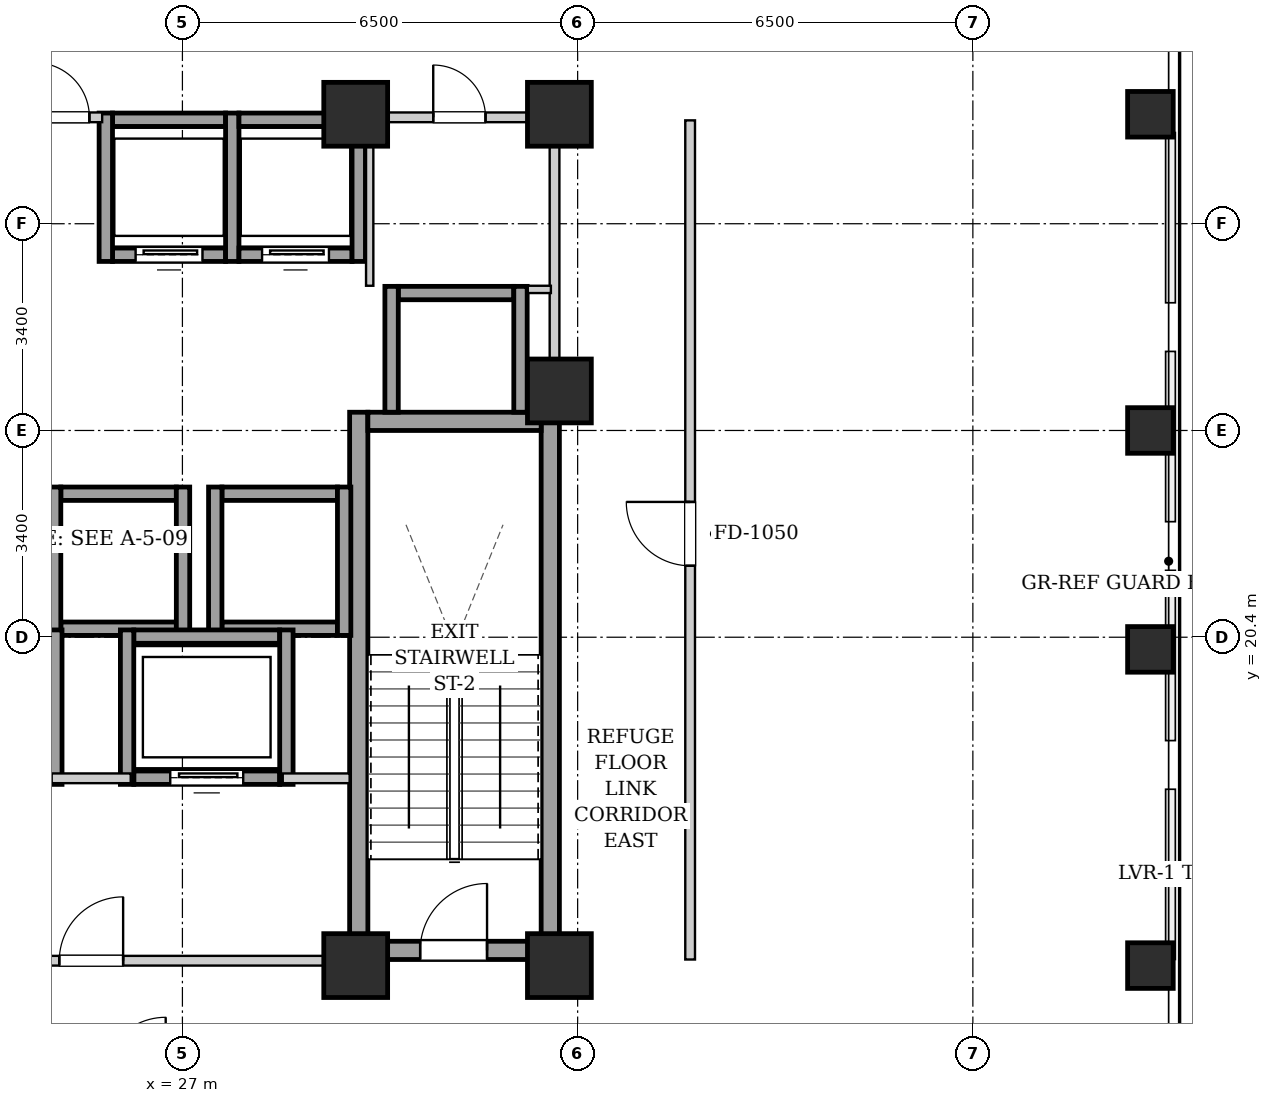
"""IFC4 building model, lengths in metres.
Left out: names, types, materials, properties, quantities, classifications, styles, units other than length and angle.
Written with IfcOpenShell. Run it as: python <this file> out.ifc"""

import sys

from ifc_helpers import new_model, si_unit, direction, frame, frame_2d, origin, origin_2d, place, context, subcontext, project, spatial, rectangle, extrude, element, fill, save


model = new_model("IFC4")
c1 = context("Model", 3, precision=1e-05, world=origin(), true_north=direction((0.0, 1.0)))
c2 = subcontext(c1, "Body", "Model", "MODEL_VIEW")
j1 = project(units=[si_unit("LENGTHUNIT", "METRE"), si_unit("PLANEANGLEUNIT", "RADIAN")], contexts=[c1])
p1 = place(None, origin())
s1 = spatial("IfcSite", under=j1, at=p1, CompositionType="ELEMENT")
p2 = place(p1, origin())
s2 = spatial("IfcBuilding", under=s1, at=p2, CompositionType="ELEMENT")
p3 = place(p2, frame((0.0, 0.0, 119.9)))
s3 = spatial("IfcBuildingStorey", under=s2, at=p3, CompositionType="ELEMENT", Elevation=119.9)
for number, where, z_axis, x_axis in (
    (1, (42.92, 15.0, 0.0), (0.0, 0.0, 1.0), (1.0, 0.0, 0.0)),
    (2, (42.92, 20.2, 0.0), (0.0, 0.0, 1.0), (1.0, 0.0, 0.0)),
    (3, (42.92, 23.8, 0.0), (0.0, 0.0, 1.0), (1.0, 0.0, 0.0)),
    (4, (42.92, 29.0, 0.0), (0.0, 0.0, 1.0), (1.0, 0.0, 0.0)),
):
    element("IfcColumn", number, at=place(p3, frame(where, z_axis=z_axis, x_axis=x_axis)), inside=s3, PredefinedType="COLUMN", context=c2, shape_type="SweptSolid", body=[
        extrude(rectangle(XDim=0.75, YDim=0.75, at=origin_2d()), origin(), (0.0, 0.0, 1.0), 4.5),
    ])
for number, where, z_axis, x_axis in (
    (5, (29.85, 15.0, 0.0), (0.0, 0.0, 1.0), (1.0, 0.0, 0.0)),
    (6, (33.2, 15.0, 0.0), (0.0, 0.0, 1.0), (1.0, 0.0, 0.0)),
    (7, (29.85, 29.0, 0.0), (0.0, 0.0, 1.0), (1.0, 0.0, 0.0)),
    (8, (33.2, 29.0, 0.0), (0.0, 0.0, 1.0), (1.0, 0.0, 0.0)),
    (9, (33.2, 24.45, 0.0), (0.0, 0.0, 1.0), (1.0, 0.0, 0.0)),
):
    element("IfcColumn", number, at=place(p3, frame(where, z_axis=z_axis, x_axis=x_axis)), inside=s3, PredefinedType="COLUMN", context=c2, shape_type="SweptSolid", body=[
        extrude(rectangle(XDim=1.05, YDim=1.05, at=origin_2d()), origin(), (0.0, 0.0, 1.0), 4.5),
    ])
for number, where, z_axis, x_axis in (
    (10, (29.9, 15.1, 0.0), (0.0, 0.0, 1.0), (0.0, 1.0, 0.0)),
    (11, (33.05, 15.1, 0.0), (0.0, 0.0, 1.0), (0.0, 1.0, 0.0)),
):
    element("IfcWall", number, at=place(p3, frame(where, z_axis=z_axis, x_axis=x_axis)), inside=s3, PredefinedType="SHEAR", context=c2, shape_type="SweptSolid", body=[
        extrude(rectangle(XDim=9.0, YDim=0.3, at=frame_2d((4.5, 0.0))), origin(), (0.0, 0.0, 1.0), 4.18),
    ])
p4 = place(p3, frame((30.05, 23.95, 0.0), z_axis=(0.0, 0.0, 1.0), x_axis=(1.0, 0.0, 0.0)))
e12 = element("IfcWall", 12, at=p4, inside=s3, PredefinedType="SHEAR", context=c2, shape_type="SweptSolid", body=[
    extrude(rectangle(XDim=2.85, YDim=0.3, at=frame_2d((1.425, 0.0))), origin(), (0.0, 0.0, 1.0), 4.18),
])
p5 = place(p3, frame((30.05, 15.25, 0.0), z_axis=(0.0, 0.0, 1.0), x_axis=(1.0, 0.0, 0.0)))
e13 = element("IfcWall", 13, at=p5, inside=s3, PredefinedType="SHEAR", context=c2, shape_type="SweptSolid", body=[
    extrude(rectangle(XDim=2.85, YDim=0.3, at=frame_2d((1.425, 0.0))), origin(), (0.0, 0.0, 1.0), 4.18),
])
p6 = place(p5, frame((0.86, 0.0, 0.0)))
e14 = element("IfcOpeningElement", 14, at=p6, cuts=e13, PredefinedType="OPENING", context=c2, shape_type="SweptSolid", body=[
    extrude(rectangle(XDim=1.1, YDim=2.05, at=frame_2d((0.55, 1.025))), frame((0.0, 0.16, 0.0), z_axis=(0.0, -1.0, 0.0), x_axis=(1.0, 0.0, 0.0)), (0.0, 0.0, 1.0), 0.32),
])
p7 = place(p3, frame((25.85, 26.69, 0.0), z_axis=(0.0, 0.0, 1.0), x_axis=(1.0, 0.0, 0.0)))
e15 = element("IfcWall", 15, at=p7, inside=s3, PredefinedType="SHEAR", context=c2, shape_type="SweptSolid", body=[
    extrude(rectangle(XDim=1.86, YDim=0.22, at=frame_2d((0.93, 0.0))), origin(), (0.0, 0.0, 1.0), 4.18),
])
p8 = place(p7, frame((0.38, 0.0, 0.0)))
e16 = element("IfcOpeningElement", 16, at=p8, cuts=e15, PredefinedType="OPENING", context=c2, shape_type="SweptSolid", body=[
    extrude(rectangle(XDim=1.1, YDim=2.15, at=frame_2d((0.55, 1.075))), frame((0.0, 0.12, 0.0), z_axis=(0.0, -1.0, 0.0), x_axis=(1.0, 0.0, 0.0)), (0.0, 0.0, 1.0), 0.24),
])
p9 = place(p3, frame((25.85, 28.91, 0.0), z_axis=(0.0, 0.0, 1.0), x_axis=(1.0, 0.0, 0.0)))
e17 = element("IfcWall", 17, at=p9, inside=s3, PredefinedType="SHEAR", context=c2, shape_type="SweptSolid", body=[
    extrude(rectangle(XDim=1.86, YDim=0.22, at=frame_2d((0.93, 0.0))), origin(), (0.0, 0.0, 1.0), 4.18),
])
for number, where, z_axis, x_axis in (
    (18, (25.74, 26.58, 0.0), (0.0, 0.0, 1.0), (0.0, 1.0, 0.0)),
    (19, (27.82, 26.58, 0.0), (0.0, 0.0, 1.0), (0.0, 1.0, 0.0)),
):
    element("IfcWall", number, at=place(p3, frame(where, z_axis=z_axis, x_axis=x_axis)), inside=s3, PredefinedType="SHEAR", context=c2, shape_type="SweptSolid", body=[
        extrude(rectangle(XDim=2.44, YDim=0.22, at=frame_2d((1.22, 0.0))), origin(), (0.0, 0.0, 1.0), 4.18),
    ])
p10 = place(p3, frame((27.93, 26.69, 0.0), z_axis=(0.0, 0.0, 1.0), x_axis=(1.0, 0.0, 0.0)))
e20 = element("IfcWall", 20, at=p10, inside=s3, PredefinedType="SHEAR", context=c2, shape_type="SweptSolid", body=[
    extrude(rectangle(XDim=1.86, YDim=0.22, at=frame_2d((0.93, 0.0))), origin(), (0.0, 0.0, 1.0), 4.18),
])
p11 = place(p10, frame((0.38, 0.0, 0.0)))
e21 = element("IfcOpeningElement", 21, at=p11, cuts=e20, PredefinedType="OPENING", context=c2, shape_type="SweptSolid", body=[
    extrude(rectangle(XDim=1.1, YDim=2.15, at=frame_2d((0.55, 1.075))), frame((0.0, 0.12, 0.0), z_axis=(0.0, -1.0, 0.0), x_axis=(1.0, 0.0, 0.0)), (0.0, 0.0, 1.0), 0.24),
])
p12 = place(p3, frame((27.93, 28.91, 0.0), z_axis=(0.0, 0.0, 1.0), x_axis=(1.0, 0.0, 0.0)))
e22 = element("IfcWall", 22, at=p12, inside=s3, PredefinedType="SHEAR", context=c2, shape_type="SweptSolid", body=[
    extrude(rectangle(XDim=1.86, YDim=0.22, at=frame_2d((0.93, 0.0))), origin(), (0.0, 0.0, 1.0), 4.18),
])
p13 = place(p3, frame((29.9, 26.58, 0.0), z_axis=(0.0, 0.0, 1.0), x_axis=(0.0, 1.0, 0.0)))
e23 = element("IfcWall", 23, at=p13, inside=s3, PredefinedType="SHEAR", context=c2, shape_type="SweptSolid", body=[
    extrude(rectangle(XDim=2.44, YDim=0.22, at=frame_2d((1.22, 0.0))), origin(), (0.0, 0.0, 1.0), 4.18),
])
for number, where, z_axis, x_axis in (
    (24, (25.0, 20.54, 0.0), (0.0, 0.0, 1.0), (1.0, 0.0, 0.0)),
    (25, (25.0, 22.76, 0.0), (0.0, 0.0, 1.0), (1.0, 0.0, 0.0)),
):
    element("IfcWall", number, at=place(p3, frame(where, z_axis=z_axis, x_axis=x_axis)), inside=s3, PredefinedType="SHEAR", context=c2, shape_type="SweptSolid", body=[
        extrude(rectangle(XDim=1.9, YDim=0.22, at=frame_2d((0.95, 0.0))), origin(), (0.0, 0.0, 1.0), 4.18),
    ])
for number, where, z_axis, x_axis in (
    (26, (24.89, 20.43, 0.0), (0.0, 0.0, 1.0), (0.0, 1.0, 0.0)),
    (27, (27.01, 20.43, 0.0), (0.0, 0.0, 1.0), (0.0, 1.0, 0.0)),
):
    element("IfcWall", number, at=place(p3, frame(where, z_axis=z_axis, x_axis=x_axis)), inside=s3, PredefinedType="SHEAR", context=c2, shape_type="SweptSolid", body=[
        extrude(rectangle(XDim=2.44, YDim=0.22, at=frame_2d((1.22, 0.0))), origin(), (0.0, 0.0, 1.0), 4.18),
    ])
for number, where, z_axis, x_axis in (
    (28, (27.65, 20.54, 0.0), (0.0, 0.0, 1.0), (1.0, 0.0, 0.0)),
    (29, (27.65, 22.76, 0.0), (0.0, 0.0, 1.0), (1.0, 0.0, 0.0)),
):
    element("IfcWall", number, at=place(p3, frame(where, z_axis=z_axis, x_axis=x_axis)), inside=s3, PredefinedType="SHEAR", context=c2, shape_type="SweptSolid", body=[
        extrude(rectangle(XDim=1.9, YDim=0.22, at=frame_2d((0.95, 0.0))), origin(), (0.0, 0.0, 1.0), 4.18),
    ])
for number, where, z_axis, x_axis in (
    (30, (27.54, 20.43, 0.0), (0.0, 0.0, 1.0), (0.0, 1.0, 0.0)),
    (31, (29.66, 20.43, 0.0), (0.0, 0.0, 1.0), (0.0, 1.0, 0.0)),
):
    element("IfcWall", number, at=place(p3, frame(where, z_axis=z_axis, x_axis=x_axis)), inside=s3, PredefinedType="SHEAR", context=c2, shape_type="SweptSolid", body=[
        extrude(rectangle(XDim=2.44, YDim=0.22, at=frame_2d((1.22, 0.0))), origin(), (0.0, 0.0, 1.0), 4.18),
    ])
p14 = place(p3, frame((30.55, 26.06, 0.0), z_axis=(0.0, 0.0, 1.0), x_axis=(1.0, 0.0, 0.0)))
e32 = element("IfcWall", 32, at=p14, inside=s3, PredefinedType="SHEAR", context=c2, shape_type="SweptSolid", body=[
    extrude(rectangle(XDim=1.9, YDim=0.22, at=frame_2d((0.95, 0.0))), origin(), (0.0, 0.0, 1.0), 4.18),
])
for number, where, z_axis, x_axis in (
    (33, (30.44, 24.1, 0.0), (0.0, 0.0, 1.0), (0.0, 1.0, 0.0)),
    (34, (32.56, 24.1, 0.0), (0.0, 0.0, 1.0), (0.0, 1.0, 0.0)),
):
    element("IfcWall", number, at=place(p3, frame(where, z_axis=z_axis, x_axis=x_axis)), inside=s3, PredefinedType="SHEAR", context=c2, shape_type="SweptSolid", body=[
        extrude(rectangle(XDim=2.07, YDim=0.22, at=frame_2d((1.035, 0.0))), origin(), (0.0, 0.0, 1.0), 4.18),
    ])
p15 = place(p3, frame((24.91, 17.98, 0.0), z_axis=(0.0, 0.0, 1.0), x_axis=(0.0, 1.0, 0.0)))
e35 = element("IfcWall", 35, at=p15, inside=s3, PredefinedType="SHEAR", context=c2, shape_type="SweptSolid", body=[
    extrude(rectangle(XDim=2.54, YDim=0.22, at=frame_2d((1.27, 0.0))), origin(), (0.0, 0.0, 1.0), 4.18),
])
p16 = place(p3, frame((26.2, 18.09, 0.0), z_axis=(0.0, 0.0, 1.0), x_axis=(1.0, 0.0, 0.0)))
e36 = element("IfcWall", 36, at=p16, inside=s3, PredefinedType="SHEAR", context=c2, shape_type="SweptSolid", body=[
    extrude(rectangle(XDim=2.4, YDim=0.22, at=frame_2d((1.2, 0.0))), origin(), (0.0, 0.0, 1.0), 4.18),
])
p17 = place(p16, frame((0.6, 0.0, 0.0)))
e37 = element("IfcOpeningElement", 37, at=p17, cuts=e36, PredefinedType="OPENING", context=c2, shape_type="SweptSolid", body=[
    extrude(rectangle(XDim=1.2, YDim=2.15, at=frame_2d((0.6, 1.075))), frame((0.0, 0.12, 0.0), z_axis=(0.0, -1.0, 0.0), x_axis=(1.0, 0.0, 0.0)), (0.0, 0.0, 1.0), 0.24),
])
p18 = place(p3, frame((26.2, 20.41, 0.0), z_axis=(0.0, 0.0, 1.0), x_axis=(1.0, 0.0, 0.0)))
e38 = element("IfcWall", 38, at=p18, inside=s3, PredefinedType="SHEAR", context=c2, shape_type="SweptSolid", body=[
    extrude(rectangle(XDim=2.4, YDim=0.22, at=frame_2d((1.2, 0.0))), origin(), (0.0, 0.0, 1.0), 4.18),
])
for number, where, z_axis, x_axis in (
    (39, (26.09, 17.98, 0.0), (0.0, 0.0, 1.0), (0.0, 1.0, 0.0)),
    (40, (28.71, 17.98, 0.0), (0.0, 0.0, 1.0), (0.0, 1.0, 0.0)),
):
    element("IfcWall", number, at=place(p3, frame(where, z_axis=z_axis, x_axis=x_axis)), inside=s3, PredefinedType="SHEAR", context=c2, shape_type="SweptSolid", body=[
        extrude(rectangle(XDim=2.54, YDim=0.22, at=frame_2d((1.27, 0.0))), origin(), (0.0, 0.0, 1.0), 4.18),
    ])
p19 = place(p3, frame((21.25, 15.08, 0.0), z_axis=(0.0, 0.0, 1.0), x_axis=(1.0, 0.0, 0.0)))
e41 = element("IfcWall", 41, at=p19, inside=s3, PredefinedType="PARTITIONING", context=c2, shape_type="SweptSolid", body=[
    extrude(rectangle(XDim=8.5, YDim=0.16, at=frame_2d((4.25, 0.0))), origin(), (0.0, 0.0, 1.0), 4.18),
])
p20 = place(p19, frame((3.725, 0.0, 0.0)))
e42 = element("IfcOpeningElement", 42, at=p20, cuts=e41, PredefinedType="OPENING", context=c2, shape_type="SweptSolid", body=[
    extrude(rectangle(XDim=1.05, YDim=2.05, at=frame_2d((0.525, 1.025))), frame((0.0, 0.09, 0.0), z_axis=(0.0, -1.0, 0.0), x_axis=(1.0, 0.0, 0.0)), (0.0, 0.0, 1.0), 0.18),
])
p21 = place(p3, frame((24.85, 18.08, 0.0), z_axis=(0.0, 0.0, 1.0), x_axis=(1.0, 0.0, 0.0)))
e43 = element("IfcWall", 43, at=p21, inside=s3, PredefinedType="PARTITIONING", context=c2, shape_type="SweptSolid", body=[
    extrude(rectangle(XDim=1.3, YDim=0.16, at=frame_2d((0.65, 0.0))), origin(), (0.0, 0.0, 1.0), 4.18),
])
p22 = place(p3, frame((28.65, 18.08, 0.0), z_axis=(0.0, 0.0, 1.0), x_axis=(1.0, 0.0, 0.0)))
e44 = element("IfcWall", 44, at=p22, inside=s3, PredefinedType="PARTITIONING", context=c2, shape_type="SweptSolid", body=[
    extrude(rectangle(XDim=1.1, YDim=0.16, at=frame_2d((0.55, 0.0))), origin(), (0.0, 0.0, 1.0), 4.18),
])
p23 = place(p3, frame((33.12, 24.12, 0.0), z_axis=(0.0, 0.0, 1.0), x_axis=(0.0, 1.0, 0.0)))
e45 = element("IfcWall", 45, at=p23, inside=s3, PredefinedType="PARTITIONING", context=c2, shape_type="SweptSolid", body=[
    extrude(rectangle(XDim=4.76, YDim=0.16, at=frame_2d((2.38, 0.0))), origin(), (0.0, 0.0, 1.0), 4.18),
])
p24 = place(p3, frame((24.36, 28.95, 0.0), z_axis=(0.0, 0.0, 1.0), x_axis=(1.0, 0.0, 0.0)))
e46 = element("IfcWall", 46, at=p24, inside=s3, PredefinedType="PARTITIONING", context=c2, shape_type="SweptSolid", body=[
    extrude(rectangle(XDim=1.32, YDim=0.16, at=frame_2d((0.66, 0.0))), origin(), (0.0, 0.0, 1.0), 4.18),
])
p25 = place(p24, frame((0.21, 0.0, 0.0)))
e47 = element("IfcOpeningElement", 47, at=p25, cuts=e46, PredefinedType="OPENING", context=c2, shape_type="SweptSolid", body=[
    extrude(rectangle(XDim=0.9, YDim=2.05, at=frame_2d((0.45, 1.025))), frame((0.0, 0.09, 0.0), z_axis=(0.0, -1.0, 0.0), x_axis=(1.0, 0.0, 0.0)), (0.0, 0.0, 1.0), 0.18),
])
p26 = place(p3, frame((30.08, 26.18, 0.0), z_axis=(0.0, 0.0, 1.0), x_axis=(0.0, 1.0, 0.0)))
e48 = element("IfcWall", 48, at=p26, inside=s3, PredefinedType="PARTITIONING", context=c2, shape_type="SweptSolid", body=[
    extrude(rectangle(XDim=2.68, YDim=0.12, at=frame_2d((1.34, 0.0))), origin(), (0.0, 0.0, 1.0), 4.18),
])
p27 = place(p3, frame((32.68, 26.12, 0.0), z_axis=(0.0, 0.0, 1.0), x_axis=(1.0, 0.0, 0.0)))
e49 = element("IfcWall", 49, at=p27, inside=s3, PredefinedType="PARTITIONING", context=c2, shape_type="SweptSolid", body=[
    extrude(rectangle(XDim=0.38, YDim=0.12, at=frame_2d((0.19, 0.0))), origin(), (0.0, 0.0, 1.0), 4.18),
])
p28 = place(p3, frame((30.08, 28.95, 0.0), z_axis=(0.0, 0.0, 1.0), x_axis=(1.0, 0.0, 0.0)))
e50 = element("IfcWall", 50, at=p28, inside=s3, PredefinedType="PARTITIONING", context=c2, shape_type="SweptSolid", body=[
    extrude(rectangle(XDim=2.96, YDim=0.16, at=frame_2d((1.48, 0.0))), origin(), (0.0, 0.0, 1.0), 4.18),
])
p29 = place(p28, frame((1.045, 0.0, 0.0)))
e51 = element("IfcOpeningElement", 51, at=p29, cuts=e50, PredefinedType="OPENING", context=c2, shape_type="SweptSolid", body=[
    extrude(rectangle(XDim=0.86, YDim=2.05, at=frame_2d((0.43, 1.025))), frame((0.0, 0.09, 0.0), z_axis=(0.0, -1.0, 0.0), x_axis=(1.0, 0.0, 0.0)), (0.0, 0.0, 1.0), 0.18),
])
p30 = place(p3, frame((35.35, 15.1, 0.0), z_axis=(0.0, 0.0, 1.0), x_axis=(0.0, 1.0, 0.0)))
e52 = element("IfcWall", 52, at=p30, inside=s3, PredefinedType="PARTITIONING", context=c2, shape_type="SweptSolid", body=[
    extrude(rectangle(XDim=13.8, YDim=0.16, at=frame_2d((6.9, 0.0))), origin(), (0.0, 0.0, 1.0), 4.18),
])
p31 = place(p30, frame((6.475, 0.0, 0.0)))
e53 = element("IfcOpeningElement", 53, at=p31, cuts=e52, PredefinedType="OPENING", context=c2, shape_type="SweptSolid", body=[
    extrude(rectangle(XDim=1.05, YDim=2.05, at=frame_2d((0.525, 1.025))), frame((0.0, 0.09, 0.0), z_axis=(0.0, -1.0, 0.0), x_axis=(1.0, 0.0, 0.0)), (0.0, 0.0, 1.0), 0.18),
])
p32 = place(p6, origin())
e54 = element("IfcDoor", 54, at=p32, inside=s3, OperationType="SINGLE_SWING_RIGHT", PredefinedType="DOOR", context=c2, shape_type="SweptSolid", body=[
    extrude(rectangle(XDim=1.1, YDim=2.05, at=frame_2d((0.55, 1.025))), frame((0.0, 0.025, 0.0), z_axis=(0.0, -1.0, 0.0), x_axis=(1.0, 0.0, 0.0)), (0.0, 0.0, 1.0), 0.05),
])
fill(e14, e54)
p33 = place(p8, origin())
e55 = element("IfcDoor", 55, at=p33, inside=s3, OperationType="SLIDING_TO_LEFT", PredefinedType="DOOR", context=c2, shape_type="SweptSolid", body=[
    extrude(rectangle(XDim=1.1, YDim=2.15, at=frame_2d((0.55, 1.075))), frame((0.0, 0.025, 0.0), z_axis=(0.0, -1.0, 0.0), x_axis=(1.0, 0.0, 0.0)), (0.0, 0.0, 1.0), 0.05),
])
fill(e16, e55)
p34 = place(p11, origin())
e56 = element("IfcDoor", 56, at=p34, inside=s3, OperationType="SLIDING_TO_LEFT", PredefinedType="DOOR", context=c2, shape_type="SweptSolid", body=[
    extrude(rectangle(XDim=1.1, YDim=2.15, at=frame_2d((0.55, 1.075))), frame((0.0, 0.025, 0.0), z_axis=(0.0, -1.0, 0.0), x_axis=(1.0, 0.0, 0.0)), (0.0, 0.0, 1.0), 0.05),
])
fill(e21, e56)
p35 = place(p17, origin())
e57 = element("IfcDoor", 57, at=p35, inside=s3, OperationType="SLIDING_TO_LEFT", PredefinedType="DOOR", context=c2, shape_type="SweptSolid", body=[
    extrude(rectangle(XDim=1.2, YDim=2.15, at=frame_2d((0.6, 1.075))), frame((0.0, 0.025, 0.0), z_axis=(0.0, -1.0, 0.0), x_axis=(1.0, 0.0, 0.0)), (0.0, 0.0, 1.0), 0.05),
])
fill(e37, e57)
p36 = place(p20, origin())
e58 = element("IfcDoor", 58, at=p36, inside=s3, OperationType="SINGLE_SWING_RIGHT", PredefinedType="DOOR", context=c2, shape_type="SweptSolid", body=[
    extrude(rectangle(XDim=1.05, YDim=2.05, at=frame_2d((0.525, 1.025))), frame((0.0, 0.025, 0.0), z_axis=(0.0, -1.0, 0.0), x_axis=(1.0, 0.0, 0.0)), (0.0, 0.0, 1.0), 0.05),
])
fill(e42, e58)
p37 = place(p25, origin())
e59 = element("IfcDoor", 59, at=p37, inside=s3, OperationType="SINGLE_SWING_LEFT", PredefinedType="DOOR", context=c2, shape_type="SweptSolid", body=[
    extrude(rectangle(XDim=0.9, YDim=2.05, at=frame_2d((0.45, 1.025))), frame((0.0, 0.025, 0.0), z_axis=(0.0, -1.0, 0.0), x_axis=(1.0, 0.0, 0.0)), (0.0, 0.0, 1.0), 0.05),
])
fill(e47, e59)
p38 = place(p29, origin())
e60 = element("IfcDoor", 60, at=p38, inside=s3, OperationType="SINGLE_SWING_LEFT", PredefinedType="DOOR", context=c2, shape_type="SweptSolid", body=[
    extrude(rectangle(XDim=0.86, YDim=2.05, at=frame_2d((0.43, 1.025))), frame((0.0, 0.025, 0.0), z_axis=(0.0, -1.0, 0.0), x_axis=(1.0, 0.0, 0.0)), (0.0, 0.0, 1.0), 0.05),
])
fill(e51, e60)
p39 = place(p31, origin())
e61 = element("IfcDoor", 61, at=p39, inside=s3, OperationType="SINGLE_SWING_RIGHT", PredefinedType="DOOR", context=c2, shape_type="SweptSolid", body=[
    extrude(rectangle(XDim=1.05, YDim=2.05, at=frame_2d((0.525, 1.025))), frame((0.0, 0.025, 0.0), z_axis=(0.0, -1.0, 0.0), x_axis=(1.0, 0.0, 0.0)), (0.0, 0.0, 1.0), 0.05),
])
fill(e53, e61)
save(model, sys.argv[1])
